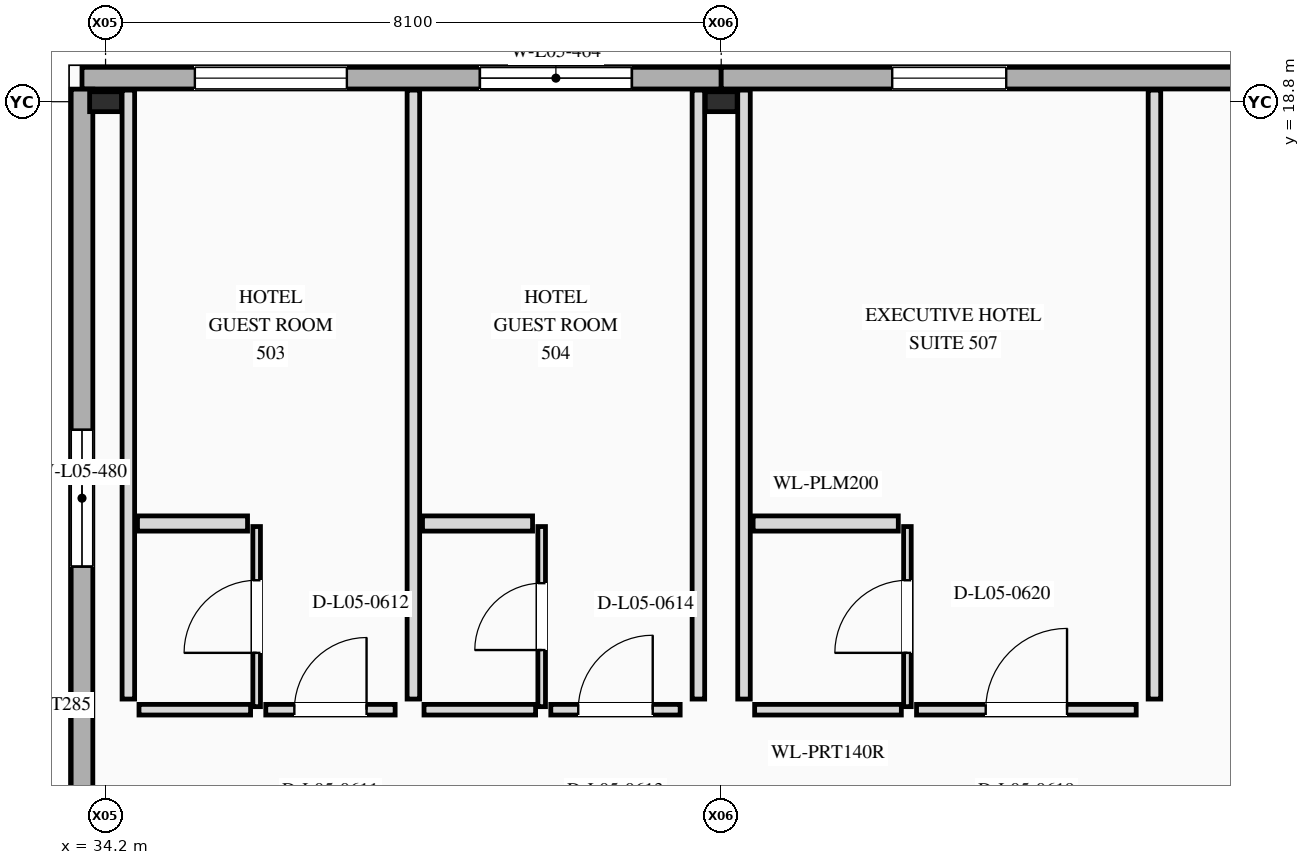
"""IFC4 building model, lengths in metres.
Left out: names, types, materials, properties, quantities, classifications, styles, units other than length and angle.
Written with IfcOpenShell. Run it as: python <this file> out.ifc"""

import sys

from ifc_helpers import new_model, si_unit, direction, frame, frame_2d, origin, origin_2d, place, context, subcontext, project, spatial, rectangle, i_section, extrude, element, fill, save


model = new_model("IFC4")
c1 = context("Model", 3, precision=1e-05, world=origin(), true_north=direction((0.0, 1.0)))
c2 = subcontext(c1, "Body", "Model", "MODEL_VIEW")
j1 = project(units=[si_unit("LENGTHUNIT", "METRE"), si_unit("PLANEANGLEUNIT", "RADIAN")], contexts=[c1])
p1 = place(None, origin())
s1 = spatial("IfcSite", under=j1, at=p1, CompositionType="ELEMENT")
p2 = place(p1, origin())
s2 = spatial("IfcBuilding", under=s1, at=p2, CompositionType="ELEMENT")
p3 = place(p2, frame((0.0, 0.0, 23.4)))
s3 = spatial("IfcBuildingStorey", under=s2, at=p3, CompositionType="ELEMENT", Elevation=23.4)
for number, where, z_axis, x_axis in (
    (1, (34.2, 18.8, 0.0), (0.0, 0.0, 1.0), (0.0, 1.0, 0.0)),
    (2, (42.3, 18.8, 0.0), (0.0, 0.0, 1.0), (0.0, 1.0, 0.0)),
):
    element("IfcColumn", number, at=place(p3, frame(where, z_axis=z_axis, x_axis=x_axis)), inside=s3, PredefinedType="COLUMN", context=c2, shape_type="SweptSolid", body=[
        extrude(i_section(OverallWidth=0.262, OverallDepth=0.419, WebThickness=0.012, FlangeThickness=0.019, at=origin_2d()), origin(), (0.0, 0.0, 1.0), 3.6),
    ])
p4 = place(p3, frame((42.3, 19.11, 0.0), z_axis=(0.0, 0.0, 1.0), x_axis=(-1.0, 0.0, 0.0)))
e3 = element("IfcWall", 3, at=p4, inside=s3, PredefinedType="STANDARD", context=c2, shape_type="SweptSolid", body=[
    extrude(rectangle(XDim=8.41, YDim=0.285, at=frame_2d((4.205, 0.0))), origin(), (0.0, 0.0, 1.0), 3.6),
])
p5 = place(p4, frame((4.925, 0.0, 0.85)))
e4 = element("IfcOpeningElement", 4, at=p5, cuts=e3, PredefinedType="OPENING", context=c2, shape_type="SweptSolid", body=[
    extrude(rectangle(XDim=2.0, YDim=1.65, at=frame_2d((1.0, 0.825))), frame((0.0, 0.152, 0.0), z_axis=(0.0, -1.0, 0.0), x_axis=(1.0, 0.0, 0.0)), (0.0, 0.0, 1.0), 0.305),
])
p6 = place(p4, frame((1.175, 0.0, 0.85)))
e5 = element("IfcOpeningElement", 5, at=p6, cuts=e3, PredefinedType="OPENING", context=c2, shape_type="SweptSolid", body=[
    extrude(rectangle(XDim=2.0, YDim=1.65, at=frame_2d((1.0, 0.825))), frame((0.0, 0.152, 0.0), z_axis=(0.0, -1.0, 0.0), x_axis=(1.0, 0.0, 0.0)), (0.0, 0.0, 1.0), 0.305),
])
p7 = place(p3, frame((50.4, 19.11, 0.0), z_axis=(0.0, 0.0, 1.0), x_axis=(-1.0, 0.0, 0.0)))
e6 = element("IfcWall", 6, at=p7, inside=s3, PredefinedType="STANDARD", context=c2, shape_type="SweptSolid", body=[
    extrude(rectangle(XDim=8.1, YDim=0.285, at=frame_2d((4.05, 0.0))), origin(), (0.0, 0.0, 1.0), 3.6),
])
p8 = place(p7, frame((4.35, 0.0, 0.85)))
e7 = element("IfcOpeningElement", 7, at=p8, cuts=e6, PredefinedType="OPENING", context=c2, shape_type="SweptSolid", body=[
    extrude(rectangle(XDim=1.5, YDim=1.7, at=frame_2d((0.75, 0.85))), frame((0.0, 0.152, 0.0), z_axis=(0.0, -1.0, 0.0), x_axis=(1.0, 0.0, 0.0)), (0.0, 0.0, 1.0), 0.305),
])
p9 = place(p3, frame((33.89, 18.966, 0.0), z_axis=(0.0, 0.0, 1.0), x_axis=(0.0, -1.0, 0.0)))
e8 = element("IfcWall", 8, at=p9, inside=s3, PredefinedType="STANDARD", context=c2, shape_type="SweptSolid", body=[
    extrude(rectangle(XDim=10.766, YDim=0.285, at=frame_2d((5.383, 0.0))), origin(), (0.0, 0.0, 1.0), 3.6),
])
p10 = place(p9, frame((4.483, 0.0, 0.88)))
e9 = element("IfcOpeningElement", 9, at=p10, cuts=e8, PredefinedType="OPENING", context=c2, shape_type="SweptSolid", body=[
    extrude(rectangle(XDim=1.8, YDim=1.8, at=frame_2d((0.9, 0.9))), frame((0.0, 0.152, 0.0), z_axis=(0.0, -1.0, 0.0), x_axis=(1.0, 0.0, 0.0)), (0.0, 0.0, 1.0), 0.305),
])
p11 = place(p3, frame((34.64, 10.8, 0.0), z_axis=(0.0, 0.0, 1.0), x_axis=(1.0, 0.0, 0.0)))
e10 = element("IfcWall", 10, at=p11, inside=s3, PredefinedType="PARTITIONING", context=c2, shape_type="SweptSolid", body=[
    extrude(rectangle(XDim=1.468, YDim=0.14, at=frame_2d((0.734, 0.0))), origin(), (0.0, 0.0, 1.0), 3.3),
])
p12 = place(p3, frame((36.308, 10.8, 0.0), z_axis=(0.0, 0.0, 1.0), x_axis=(1.0, 0.0, 0.0)))
e11 = element("IfcWall", 11, at=p12, inside=s3, PredefinedType="PARTITIONING", context=c2, shape_type="SweptSolid", body=[
    extrude(rectangle(XDim=1.702, YDim=0.14, at=frame_2d((0.851, 0.0))), origin(), (0.0, 0.0, 1.0), 3.3),
])
p13 = place(p12, frame((0.376, 0.0, 0.0)))
e12 = element("IfcOpeningElement", 12, at=p13, cuts=e11, PredefinedType="OPENING", context=c2, shape_type="SweptSolid", body=[
    extrude(rectangle(XDim=0.95, YDim=2.3, at=frame_2d((0.475, 1.15))), frame((0.0, 0.08, 0.0), z_axis=(0.0, -1.0, 0.0), x_axis=(1.0, 0.0, 0.0)), (0.0, 0.0, 1.0), 0.16),
])
p14 = place(p3, frame((34.5, 10.94, 0.0), z_axis=(0.0, 0.0, 1.0), x_axis=(0.0, 1.0, 0.0)))
e13 = element("IfcWall", 13, at=p14, inside=s3, PredefinedType="PARTITIONING", context=c2, shape_type="SweptSolid", body=[
    extrude(rectangle(XDim=8.012, YDim=0.165, at=frame_2d((4.006, 0.0))), origin(), (0.0, 0.0, 1.0), 2.629),
])
p15 = place(p3, frame((38.25, 10.94, 0.0), z_axis=(0.0, 0.0, 1.0), x_axis=(0.0, 1.0, 0.0)))
e14 = element("IfcWall", 14, at=p15, inside=s3, PredefinedType="PARTITIONING", context=c2, shape_type="SweptSolid", body=[
    extrude(rectangle(XDim=8.012, YDim=0.165, at=frame_2d((4.006, 0.0))), origin(), (0.0, 0.0, 1.0), 2.713),
])
p16 = place(p3, frame((36.188, 10.84, 0.0), z_axis=(0.0, 0.0, 1.0), x_axis=(0.0, 1.0, 0.0)))
e15 = element("IfcWall", 15, at=p16, inside=s3, PredefinedType="PARTITIONING", context=c2, shape_type="SweptSolid", body=[
    extrude(rectangle(XDim=2.37, YDim=0.1, at=frame_2d((1.185, 0.0))), origin(), (0.0, 0.0, 1.0), 2.969),
])
p17 = place(p16, frame((0.708, 0.0, 0.0)))
e16 = element("IfcOpeningElement", 16, at=p17, cuts=e15, PredefinedType="OPENING", context=c2, shape_type="SweptSolid", body=[
    extrude(rectangle(XDim=0.955, YDim=2.22, at=frame_2d((0.478, 1.11))), frame((0.0, 0.06, 0.0), z_axis=(0.0, -1.0, 0.0), x_axis=(1.0, 0.0, 0.0)), (0.0, 0.0, 1.0), 0.12),
])
p18 = place(p3, frame((34.62, 13.25, 0.0), z_axis=(0.0, 0.0, 1.0), x_axis=(1.0, 0.0, 0.0)))
e17 = element("IfcWall", 17, at=p18, inside=s3, PredefinedType="PLUMBINGWALL", context=c2, shape_type="SweptSolid", body=[
    extrude(rectangle(XDim=1.448, YDim=0.2, at=frame_2d((0.724, 0.0))), origin(), (0.0, 0.0, 1.0), 3.3),
])
p19 = place(p3, frame((38.39, 10.8, 0.0), z_axis=(0.0, 0.0, 1.0), x_axis=(1.0, 0.0, 0.0)))
e18 = element("IfcWall", 18, at=p19, inside=s3, PredefinedType="PARTITIONING", context=c2, shape_type="SweptSolid", body=[
    extrude(rectangle(XDim=1.468, YDim=0.14, at=frame_2d((0.734, 0.0))), origin(), (0.0, 0.0, 1.0), 3.3),
])
p20 = place(p3, frame((40.058, 10.8, 0.0), z_axis=(0.0, 0.0, 1.0), x_axis=(1.0, 0.0, 0.0)))
e19 = element("IfcWall", 19, at=p20, inside=s3, PredefinedType="PARTITIONING", context=c2, shape_type="SweptSolid", body=[
    extrude(rectangle(XDim=1.702, YDim=0.14, at=frame_2d((0.851, 0.0))), origin(), (0.0, 0.0, 1.0), 3.3),
])
p21 = place(p20, frame((0.361, 0.0, 0.0)))
e20 = element("IfcOpeningElement", 20, at=p21, cuts=e19, PredefinedType="OPENING", context=c2, shape_type="SweptSolid", body=[
    extrude(rectangle(XDim=0.98, YDim=2.35, at=frame_2d((0.49, 1.175))), frame((0.0, 0.08, 0.0), z_axis=(0.0, -1.0, 0.0), x_axis=(1.0, 0.0, 0.0)), (0.0, 0.0, 1.0), 0.16),
])
p22 = place(p3, frame((42.0, 10.94, 0.0), z_axis=(0.0, 0.0, 1.0), x_axis=(0.0, 1.0, 0.0)))
e21 = element("IfcWall", 21, at=p22, inside=s3, PredefinedType="PARTITIONING", context=c2, shape_type="SweptSolid", body=[
    extrude(rectangle(XDim=8.012, YDim=0.165, at=frame_2d((4.006, 0.0))), origin(), (0.0, 0.0, 1.0), 2.629),
])
p23 = place(p3, frame((39.938, 10.84, 0.0), z_axis=(0.0, 0.0, 1.0), x_axis=(0.0, 1.0, 0.0)))
e22 = element("IfcWall", 22, at=p23, inside=s3, PredefinedType="PARTITIONING", context=c2, shape_type="SweptSolid", body=[
    extrude(rectangle(XDim=2.37, YDim=0.1, at=frame_2d((1.185, 0.0))), origin(), (0.0, 0.0, 1.0), 2.969),
])
p24 = place(p23, frame((0.745, 0.0, 0.0)))
e23 = element("IfcOpeningElement", 23, at=p24, cuts=e22, PredefinedType="OPENING", context=c2, shape_type="SweptSolid", body=[
    extrude(rectangle(XDim=0.88, YDim=2.1, at=frame_2d((0.44, 1.05))), frame((0.0, 0.06, 0.0), z_axis=(0.0, -1.0, 0.0), x_axis=(1.0, 0.0, 0.0)), (0.0, 0.0, 1.0), 0.12),
])
p25 = place(p3, frame((38.37, 13.25, 0.0), z_axis=(0.0, 0.0, 1.0), x_axis=(1.0, 0.0, 0.0)))
e24 = element("IfcWall", 24, at=p25, inside=s3, PredefinedType="PLUMBINGWALL", context=c2, shape_type="SweptSolid", body=[
    extrude(rectangle(XDim=1.448, YDim=0.2, at=frame_2d((0.724, 0.0))), origin(), (0.0, 0.0, 1.0), 3.3),
])
p26 = place(p3, frame((42.74, 10.8, 0.0), z_axis=(0.0, 0.0, 1.0), x_axis=(1.0, 0.0, 0.0)))
e25 = element("IfcWall", 25, at=p26, inside=s3, PredefinedType="PARTITIONING", context=c2, shape_type="SweptSolid", body=[
    extrude(rectangle(XDim=1.93, YDim=0.14, at=frame_2d((0.965, 0.0))), origin(), (0.0, 0.0, 1.0), 3.3),
])
p27 = place(p3, frame((44.87, 10.8, 0.0), z_axis=(0.0, 0.0, 1.0), x_axis=(1.0, 0.0, 0.0)))
e26 = element("IfcWall", 26, at=p27, inside=s3, PredefinedType="PARTITIONING", context=c2, shape_type="SweptSolid", body=[
    extrude(rectangle(XDim=2.89, YDim=0.14, at=frame_2d((1.445, 0.0))), origin(), (0.0, 0.0, 1.0), 3.3),
])
p28 = place(p27, frame((0.91, 0.0, 0.0)))
e27 = element("IfcOpeningElement", 27, at=p28, cuts=e26, PredefinedType="OPENING", context=c2, shape_type="SweptSolid", body=[
    extrude(rectangle(XDim=1.07, YDim=2.4, at=frame_2d((0.535, 1.2))), frame((0.0, 0.08, 0.0), z_axis=(0.0, -1.0, 0.0), x_axis=(1.0, 0.0, 0.0)), (0.0, 0.0, 1.0), 0.16),
])
p29 = place(p3, frame((42.6, 10.94, 0.0), z_axis=(0.0, 0.0, 1.0), x_axis=(0.0, 1.0, 0.0)))
e28 = element("IfcWall", 28, at=p29, inside=s3, PredefinedType="PARTITIONING", context=c2, shape_type="SweptSolid", body=[
    extrude(rectangle(XDim=8.012, YDim=0.165, at=frame_2d((4.006, 0.0))), origin(), (0.0, 0.0, 1.0), 2.629),
])
p30 = place(p3, frame((48.0, 10.94, 0.0), z_axis=(0.0, 0.0, 1.0), x_axis=(0.0, 1.0, 0.0)))
e29 = element("IfcWall", 29, at=p30, inside=s3, PredefinedType="PARTITIONING", context=c2, shape_type="SweptSolid", body=[
    extrude(rectangle(XDim=8.012, YDim=0.165, at=frame_2d((4.006, 0.0))), origin(), (0.0, 0.0, 1.0), 3.3),
])
p31 = place(p3, frame((44.75, 10.84, 0.0), z_axis=(0.0, 0.0, 1.0), x_axis=(0.0, 1.0, 0.0)))
e30 = element("IfcWall", 30, at=p31, inside=s3, PredefinedType="PARTITIONING", context=c2, shape_type="SweptSolid", body=[
    extrude(rectangle(XDim=2.37, YDim=0.1, at=frame_2d((1.185, 0.0))), origin(), (0.0, 0.0, 1.0), 3.3),
])
p32 = place(p31, frame((0.708, 0.0, 0.0)))
e31 = element("IfcOpeningElement", 31, at=p32, cuts=e30, PredefinedType="OPENING", context=c2, shape_type="SweptSolid", body=[
    extrude(rectangle(XDim=0.955, YDim=2.14, at=frame_2d((0.478, 1.07))), frame((0.0, 0.06, 0.0), z_axis=(0.0, -1.0, 0.0), x_axis=(1.0, 0.0, 0.0)), (0.0, 0.0, 1.0), 0.12),
])
p33 = place(p3, frame((42.72, 13.25, 0.0), z_axis=(0.0, 0.0, 1.0), x_axis=(1.0, 0.0, 0.0)))
e32 = element("IfcWall", 32, at=p33, inside=s3, PredefinedType="PLUMBINGWALL", context=c2, shape_type="SweptSolid", body=[
    extrude(rectangle(XDim=1.91, YDim=0.2, at=frame_2d((0.955, 0.0))), origin(), (0.0, 0.0, 1.0), 3.3),
])
p34 = place(p5, origin())
e33 = element("IfcWindow", 33, at=p34, inside=s3, PartitioningType="SINGLE_PANEL", PredefinedType="WINDOW", context=c2, shape_type="SweptSolid", body=[
    extrude(rectangle(XDim=2.0, YDim=1.65, at=frame_2d((1.0, 0.825))), frame((0.0, 0.03, 0.0), z_axis=(0.0, -1.0, 0.0), x_axis=(1.0, 0.0, 0.0)), (0.0, 0.0, 1.0), 0.06),
])
fill(e4, e33)
p35 = place(p6, origin())
e34 = element("IfcWindow", 34, at=p35, inside=s3, PartitioningType="SINGLE_PANEL", PredefinedType="WINDOW", context=c2, shape_type="SweptSolid", body=[
    extrude(rectangle(XDim=2.0, YDim=1.65, at=frame_2d((1.0, 0.825))), frame((0.0, 0.03, 0.0), z_axis=(0.0, -1.0, 0.0), x_axis=(1.0, 0.0, 0.0)), (0.0, 0.0, 1.0), 0.06),
])
fill(e5, e34)
p36 = place(p8, origin())
e35 = element("IfcWindow", 35, at=p36, inside=s3, PartitioningType="SINGLE_PANEL", PredefinedType="WINDOW", context=c2, shape_type="SweptSolid", body=[
    extrude(rectangle(XDim=1.5, YDim=1.7, at=frame_2d((0.75, 0.85))), frame((0.0, 0.03, 0.0), z_axis=(0.0, -1.0, 0.0), x_axis=(1.0, 0.0, 0.0)), (0.0, 0.0, 1.0), 0.06),
])
fill(e7, e35)
p37 = place(p10, origin())
e36 = element("IfcWindow", 36, at=p37, inside=s3, PartitioningType="SINGLE_PANEL", PredefinedType="WINDOW", context=c2, shape_type="SweptSolid", body=[
    extrude(rectangle(XDim=1.8, YDim=1.8, at=frame_2d((0.9, 0.9))), frame((0.0, 0.03, 0.0), z_axis=(0.0, -1.0, 0.0), x_axis=(1.0, 0.0, 0.0)), (0.0, 0.0, 1.0), 0.06),
])
fill(e9, e36)
p38 = place(p13, origin())
e37 = element("IfcDoor", 37, at=p38, inside=s3, OperationType="SINGLE_SWING_RIGHT", PredefinedType="DOOR", context=c2, shape_type="SweptSolid", body=[
    extrude(rectangle(XDim=0.95, YDim=2.3, at=frame_2d((0.475, 1.15))), frame((0.0, 0.025, 0.0), z_axis=(0.0, -1.0, 0.0), x_axis=(1.0, 0.0, 0.0)), (0.0, 0.0, 1.0), 0.05),
])
fill(e12, e37)
p39 = place(p17, origin())
e38 = element("IfcDoor", 38, at=p39, inside=s3, OperationType="SINGLE_SWING_LEFT", PredefinedType="DOOR", context=c2, shape_type="SweptSolid", body=[
    extrude(rectangle(XDim=0.955, YDim=2.22, at=frame_2d((0.478, 1.11))), frame((0.0, 0.025, 0.0), z_axis=(0.0, -1.0, 0.0), x_axis=(1.0, 0.0, 0.0)), (0.0, 0.0, 1.0), 0.05),
])
fill(e16, e38)
p40 = place(p21, origin())
e39 = element("IfcDoor", 39, at=p40, inside=s3, OperationType="SINGLE_SWING_RIGHT", PredefinedType="DOOR", context=c2, shape_type="SweptSolid", body=[
    extrude(rectangle(XDim=0.98, YDim=2.35, at=frame_2d((0.49, 1.175))), frame((0.0, 0.025, 0.0), z_axis=(0.0, -1.0, 0.0), x_axis=(1.0, 0.0, 0.0)), (0.0, 0.0, 1.0), 0.05),
])
fill(e20, e39)
p41 = place(p24, origin())
e40 = element("IfcDoor", 40, at=p41, inside=s3, OperationType="SINGLE_SWING_LEFT", PredefinedType="DOOR", context=c2, shape_type="SweptSolid", body=[
    extrude(rectangle(XDim=0.88, YDim=2.1, at=frame_2d((0.44, 1.05))), frame((0.0, 0.025, 0.0), z_axis=(0.0, -1.0, 0.0), x_axis=(1.0, 0.0, 0.0)), (0.0, 0.0, 1.0), 0.05),
])
fill(e23, e40)
p42 = place(p28, origin())
e41 = element("IfcDoor", 41, at=p42, inside=s3, OperationType="SINGLE_SWING_RIGHT", PredefinedType="DOOR", context=c2, shape_type="SweptSolid", body=[
    extrude(rectangle(XDim=1.07, YDim=2.4, at=frame_2d((0.535, 1.2))), frame((0.0, 0.025, 0.0), z_axis=(0.0, -1.0, 0.0), x_axis=(1.0, 0.0, 0.0)), (0.0, 0.0, 1.0), 0.05),
])
fill(e27, e41)
p43 = place(p32, origin())
e42 = element("IfcDoor", 42, at=p43, inside=s3, OperationType="SINGLE_SWING_LEFT", PredefinedType="DOOR", context=c2, shape_type="SweptSolid", body=[
    extrude(rectangle(XDim=0.955, YDim=2.14, at=frame_2d((0.478, 1.07))), frame((0.0, 0.025, 0.0), z_axis=(0.0, -1.0, 0.0), x_axis=(1.0, 0.0, 0.0)), (0.0, 0.0, 1.0), 0.05),
])
fill(e31, e42)
save(model, sys.argv[1])
